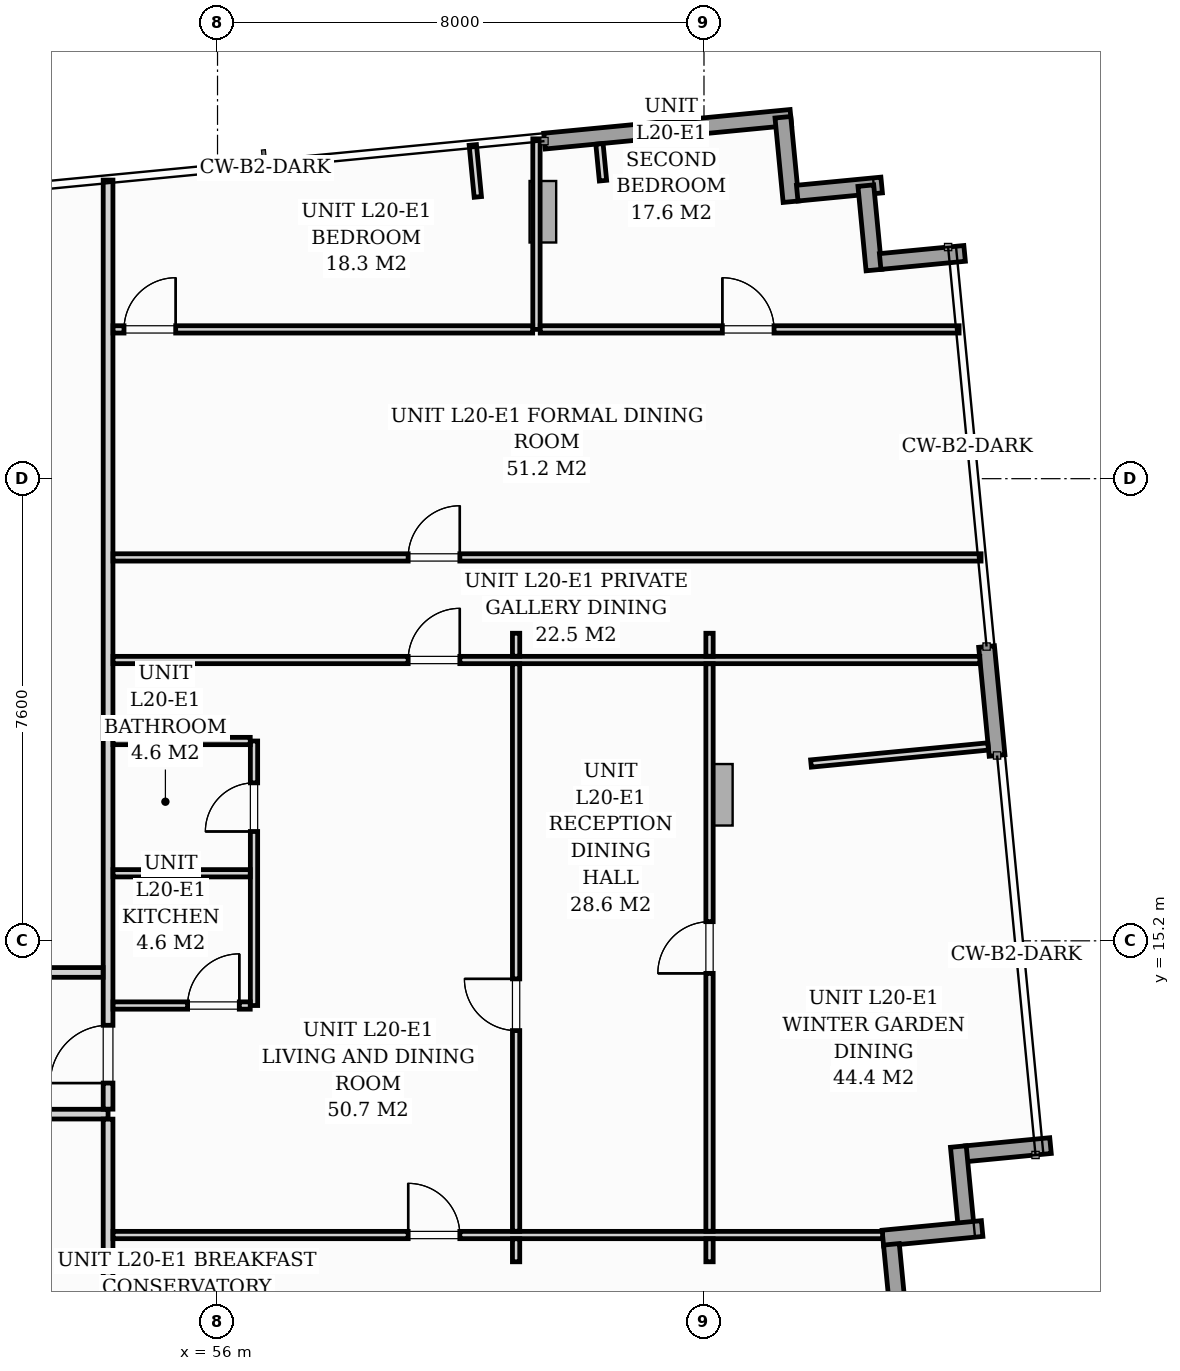
"""IFC4 building model, lengths in metres.
Left out: names, types, materials, properties, quantities, classifications, styles, units other than length and angle.
Written with IfcOpenShell. Run it as: python <this file> out.ifc"""

import sys

from ifc_helpers import new_model, si_unit, direction, frame, frame_2d, origin, origin_2d, place, context, subcontext, project, spatial, rectangle, i_section, extrude, source, transform, mapped, element, fill, save


model = new_model("IFC4")
c1 = context("Model", 3, precision=1e-05, world=origin(), true_north=direction((0.0, 1.0)))
c2 = subcontext(c1, "Body", "Model", "MODEL_VIEW")
j1 = project(units=[si_unit("LENGTHUNIT", "METRE"), si_unit("PLANEANGLEUNIT", "RADIAN")], contexts=[c1])
p1 = place(None, origin())
s1 = spatial("IfcSite", under=j1, at=p1, CompositionType="ELEMENT")
p2 = place(p1, origin())
s2 = spatial("IfcBuilding", under=s1, at=p2, CompositionType="ELEMENT")
p3 = place(p2, frame((0.0, 0.0, 72.6)))
s3 = spatial("IfcBuildingStorey", under=s2, at=p3, CompositionType="ELEMENT", Elevation=72.6)
m1 = source(origin(), c2, "Body", "SweptSolid", [
    extrude(i_section(OverallWidth=0.438, OverallDepth=1.011, WebThickness=0.041, FlangeThickness=0.074, FilletRadius=0.024, at=origin_2d()), origin(), (0.0, 0.0, 1.0), 6.973),
])
p4 = place(p3, frame((61.351, 7.073, 0.181), z_axis=(0.65764639219, 0.407667940303, 0.633488810705), x_axis=(-0.538430545128, -0.333767316198, 0.773751850861)))
e1 = element("IfcColumn", 1, at=p4, inside=s3, PredefinedType="COLUMN", context=c2, shape_type="MappedRepresentation", body=[
    mapped(m1, transform((0.0, 0.0, 0.0), scale=1.0)),
])
m2 = source(origin(), c2, "Body", "SweptSolid", [
    extrude(i_section(OverallWidth=0.438, OverallDepth=1.011, WebThickness=0.041, FlangeThickness=0.074, FilletRadius=0.024, at=origin_2d()), origin(), (0.0, 0.0, 1.0), 5.92),
])
p5 = place(p3, frame((60.451, 27.073, 0.155), z_axis=(0.650293455534, 0.084544747834, 0.754963977487), x_axis=(-0.74866329796, -0.097333825521, 0.655766263769)))
e2 = element("IfcColumn", 2, at=p5, inside=s3, PredefinedType="COLUMN", context=c2, shape_type="MappedRepresentation", body=[
    mapped(m2, transform((0.0, 0.0, 0.0), scale=1.0)),
])
m3 = source(origin(), c2, "Body", "SweptSolid", [
    extrude(i_section(OverallWidth=0.438, OverallDepth=1.011, WebThickness=0.041, FlangeThickness=0.074, FilletRadius=0.024, at=origin_2d()), origin(), (0.0, 0.0, 1.0), 6.378),
])
p6 = place(p3, frame((63.274, 17.188, 0.169), z_axis=(0.660728602065, 0.279718649785, 0.696559539002), x_axis=(-0.641445929974, -0.271555354016, 0.717498995557)))
e3 = element("IfcColumn", 3, at=p6, inside=s3, PredefinedType="COLUMN", context=c2, shape_type="MappedRepresentation", body=[
    mapped(m3, transform((0.0, 0.0, 0.0), scale=1.0)),
])
p7 = place(p3, frame((61.377, 28.351, 0.0), z_axis=(0.0, 0.0, 1.0), x_axis=(0.99539517086, 0.095856422986, 0.0)))
e4 = element("IfcWall", 4, at=p7, inside=s3, PredefinedType="STANDARD", context=c2, shape_type="SweptSolid", body=[
    extrude(rectangle(XDim=4.07, YDim=0.26, at=frame_2d((2.035, 0.0))), origin(), (0.0, 0.0, 1.0), 4.78),
])
for number, where, z_axis, x_axis in (
    (5, (65.298, 28.744, 0.0), (0.0, 0.0, 1.0), (0.096, -0.995, 0.0)),
    (6, (65.533, 27.496, 0.0), (0.0, 0.0, 1.0), (0.995, 0.096, 0.0)),
):
    element("IfcWall", number, at=place(p3, frame(where, z_axis=z_axis, x_axis=x_axis)), inside=s3, PredefinedType="STANDARD", context=c2, shape_type="SweptSolid", body=[
        extrude(rectangle(XDim=1.395, YDim=0.26, at=frame_2d((0.698, 0.0))), origin(), (0.0, 0.0, 1.0), 4.78),
    ])
p8 = place(p3, frame((66.662, 27.619, 0.0), z_axis=(0.0, 0.0, 1.0), x_axis=(0.095742423056, -0.99540614245, 0.0)))
e7 = element("IfcWall", 7, at=p8, inside=s3, PredefinedType="STANDARD", context=c2, shape_type="SweptSolid", body=[
    extrude(rectangle(XDim=1.395, YDim=0.26, at=frame_2d((0.697, 0.0))), origin(), (0.0, 0.0, 1.0), 4.78),
])
p9 = place(p3, frame((66.897, 26.371, 0.0), z_axis=(0.0, 0.0, 1.0), x_axis=(0.995391056452, 0.09589913835, 0.0)))
e8 = element("IfcWall", 8, at=p9, inside=s3, PredefinedType="STANDARD", context=c2, shape_type="SweptSolid", body=[
    extrude(rectangle(XDim=1.395, YDim=0.26, at=frame_2d((0.698, 0.0))), origin(), (0.0, 0.0, 1.0), 4.78),
])
p10 = place(p3, frame((68.647, 20.04, 0.0), z_axis=(0.0, 0.0, 1.0), x_axis=(0.095756341646, -0.995404803602, 0.0)))
e9 = element("IfcWall", 9, at=p10, inside=s3, PredefinedType="STANDARD", context=c2, shape_type="SweptSolid", body=[
    extrude(rectangle(XDim=1.8, YDim=0.26, at=frame_2d((0.9, 0.0))), origin(), (0.0, 0.0, 1.0), 4.78),
])
for number, where, z_axis, x_axis in (
    (10, (69.698, 11.833, 0.0), (0.0, 0.0, 1.0), (-0.995, -0.096, 0.0)),
    (11, (68.183, 11.817, 0.0), (0.0, 0.0, 1.0), (0.096, -0.995, 0.0)),
):
    element("IfcWall", number, at=place(p3, frame(where, z_axis=z_axis, x_axis=x_axis)), inside=s3, PredefinedType="STANDARD", context=c2, shape_type="SweptSolid", body=[
        extrude(rectangle(XDim=1.395, YDim=0.26, at=frame_2d((0.697, 0.0))), origin(), (0.0, 0.0, 1.0), 4.78),
    ])
p11 = place(p3, frame((68.574, 10.469, 0.0), z_axis=(0.0, 0.0, 1.0), x_axis=(-0.995394563142, -0.095862733462, 0.0)))
e12 = element("IfcWall", 12, at=p11, inside=s3, PredefinedType="STANDARD", context=c2, shape_type="SweptSolid", body=[
    extrude(rectangle(XDim=1.64, YDim=0.26, at=frame_2d((0.82, 0.0))), origin(), (0.0, 0.0, 1.0), 4.78),
])
p12 = place(p3, frame((67.082, 10.209, 0.0), z_axis=(0.0, 0.0, 1.0), x_axis=(0.09576095695, -0.995404359607, 0.0)))
e13 = element("IfcWall", 13, at=p12, inside=s3, PredefinedType="STANDARD", context=c2, shape_type="SweptSolid", body=[
    extrude(rectangle(XDim=1.15, YDim=0.26, at=frame_2d((0.575, 0.0))), origin(), (0.0, 0.0, 1.0), 4.78),
])
p13 = place(p3, frame((16.6, 12.35, 0.0), z_axis=(0.0, 0.0, 1.0), x_axis=(1.0, 0.0, 0.0)))
e14 = element("IfcWall", 14, at=p13, inside=s3, PredefinedType="PARTITIONING", context=c2, shape_type="SweptSolid", body=[
    extrude(rectangle(XDim=37.6, YDim=0.16, at=frame_2d((18.8, 0.0))), origin(), (0.0, 0.0, 1.0), 4.78),
])
p14 = place(p13, frame((2.665, 0.0, 0.0)))
e15 = element("IfcOpeningElement", 15, at=p14, cuts=e14, PredefinedType="OPENING", context=c2, shape_type="SweptSolid", body=[
    extrude(rectangle(XDim=0.95, YDim=2.06, at=frame_2d((0.475, 1.03))), frame((0.0, 0.09, 0.0), z_axis=(0.0, -1.0, 0.0), x_axis=(1.0, 0.0, 0.0)), (0.0, 0.0, 1.0), 0.18),
])
p15 = place(p13, frame((26.146, 0.0, 0.0)))
e16 = element("IfcOpeningElement", 16, at=p15, cuts=e14, PredefinedType="OPENING", context=c2, shape_type="SweptSolid", body=[
    extrude(rectangle(XDim=0.95, YDim=2.06, at=frame_2d((0.475, 1.03))), frame((0.0, 0.09, 0.0), z_axis=(0.0, -1.0, 0.0), x_axis=(1.0, 0.0, 0.0)), (0.0, 0.0, 1.0), 0.18),
])
p16 = place(p3, frame((54.2, 7.778, 0.0), z_axis=(0.0, 0.0, 1.0), x_axis=(0.0, 1.0, 0.0)))
e17 = element("IfcWall", 17, at=p16, inside=s3, PredefinedType="PARTITIONING", context=c2, shape_type="SweptSolid", body=[
    extrude(rectangle(XDim=4.49, YDim=0.16, at=frame_2d((2.245, 0.0))), origin(), (0.0, 0.0, 1.0), 4.78),
])
p17 = place(p3, frame((54.2, 12.432, 0.0), z_axis=(0.0, 0.0, 1.0), x_axis=(0.0, 1.0, 0.0)))
e18 = element("IfcWall", 18, at=p17, inside=s3, PredefinedType="PARTITIONING", context=c2, shape_type="SweptSolid", body=[
    extrude(rectangle(XDim=15.278, YDim=0.16, at=frame_2d((7.639, 0.0))), origin(), (0.0, 0.0, 1.0), 4.78),
])
p18 = place(p17, frame((0.429, 0.0, 0.0)))
e19 = element("IfcOpeningElement", 19, at=p18, cuts=e18, PredefinedType="OPENING", context=c2, shape_type="SweptSolid", body=[
    extrude(rectangle(XDim=0.95, YDim=2.06, at=frame_2d((0.475, 1.03))), frame((0.0, 0.09, 0.0), z_axis=(0.0, -1.0, 0.0), x_axis=(1.0, 0.0, 0.0)), (0.0, 0.0, 1.0), 0.18),
])
p19 = place(p3, frame((56.6, 14.136, 0.0), z_axis=(0.0, 0.0, 1.0), x_axis=(0.0, 1.0, 0.0)))
e20 = element("IfcWall", 20, at=p19, inside=s3, PredefinedType="PARTITIONING", context=c2, shape_type="SweptSolid", body=[
    extrude(rectangle(XDim=4.35, YDim=0.12, at=frame_2d((2.175, 0.0))), origin(), (0.0, 0.0, 1.0), 4.78),
])
p20 = place(p19, frame((2.862, 0.0, 0.0)))
e21 = element("IfcOpeningElement", 21, at=p20, cuts=e20, PredefinedType="OPENING", context=c2, shape_type="SweptSolid", body=[
    extrude(rectangle(XDim=0.8, YDim=2.02, at=frame_2d((0.4, 1.01))), frame((0.0, 0.07, 0.0), z_axis=(0.0, -1.0, 0.0), x_axis=(1.0, 0.0, 0.0)), (0.0, 0.0, 1.0), 0.14),
])
p21 = place(p3, frame((54.282, 16.311, 0.0), z_axis=(0.0, 0.0, 1.0), x_axis=(1.0, 0.0, 0.0)))
e22 = element("IfcWall", 22, at=p21, inside=s3, PredefinedType="PARTITIONING", context=c2, shape_type="SweptSolid", body=[
    extrude(rectangle(XDim=2.256, YDim=0.12, at=frame_2d((1.128, 0.0))), origin(), (0.0, 0.0, 1.0), 4.78),
])
p22 = place(p3, frame((54.282, 14.136, 0.0), z_axis=(0.0, 0.0, 1.0), x_axis=(1.0, 0.0, 0.0)))
e23 = element("IfcWall", 23, at=p22, inside=s3, PredefinedType="PARTITIONING", context=c2, shape_type="SweptSolid", body=[
    extrude(rectangle(XDim=2.256, YDim=0.12, at=frame_2d((1.128, 0.0))), origin(), (0.0, 0.0, 1.0), 4.78),
])
p23 = place(p22, frame((1.226, 0.0, 0.0)))
e24 = element("IfcOpeningElement", 24, at=p23, cuts=e23, PredefinedType="OPENING", context=c2, shape_type="SweptSolid", body=[
    extrude(rectangle(XDim=0.85, YDim=2.05, at=frame_2d((0.425, 1.025))), frame((0.0, 0.07, 0.0), z_axis=(0.0, -1.0, 0.0), x_axis=(1.0, 0.0, 0.0)), (0.0, 0.0, 1.0), 0.14),
])
p24 = place(p3, frame((54.282, 18.486, 0.0), z_axis=(0.0, 0.0, 1.0), x_axis=(1.0, 0.0, 0.0)))
e25 = element("IfcWall", 25, at=p24, inside=s3, PredefinedType="PARTITIONING", context=c2, shape_type="SweptSolid", body=[
    extrude(rectangle(XDim=2.256, YDim=0.12, at=frame_2d((1.128, 0.0))), origin(), (0.0, 0.0, 1.0), 4.78),
])
p25 = place(p3, frame((61.245, 25.255, 0.0), z_axis=(0.0, 0.0, 1.0), x_axis=(0.0, 1.0, 0.0)))
e26 = element("IfcWall", 26, at=p25, inside=s3, PredefinedType="PARTITIONING", context=c2, shape_type="SweptSolid", body=[
    extrude(rectangle(XDim=3.134, YDim=0.12, at=frame_2d((1.567, 0.0))), origin(), (0.0, 0.0, 1.0), 4.78),
])
p26 = place(p3, frame((54.282, 25.255, 0.0), z_axis=(0.0, 0.0, 1.0), x_axis=(1.0, 0.0, 0.0)))
e27 = element("IfcWall", 27, at=p26, inside=s3, PredefinedType="PARTITIONING", context=c2, shape_type="SweptSolid", body=[
    extrude(rectangle(XDim=6.901, YDim=0.12, at=frame_2d((3.451, 0.0))), origin(), (0.0, 0.0, 1.0), 4.78),
])
p27 = place(p26, frame((0.18, 0.0, 0.0)))
e28 = element("IfcOpeningElement", 28, at=p27, cuts=e27, PredefinedType="OPENING", context=c2, shape_type="SweptSolid", body=[
    extrude(rectangle(XDim=0.85, YDim=2.05, at=frame_2d((0.425, 1.025))), frame((0.0, 0.07, 0.0), z_axis=(0.0, -1.0, 0.0), x_axis=(1.0, 0.0, 0.0)), (0.0, 0.0, 1.0), 0.14),
])
p28 = place(p3, frame((61.307, 25.255, 0.0), z_axis=(0.0, 0.0, 1.0), x_axis=(1.0, 0.0, 0.0)))
e29 = element("IfcWall", 29, at=p28, inside=s3, PredefinedType="PARTITIONING", context=c2, shape_type="SweptSolid", body=[
    extrude(rectangle(XDim=6.888, YDim=0.12, at=frame_2d((3.444, 0.0))), origin(), (0.0, 0.0, 1.0), 4.78),
])
p29 = place(p28, frame((2.995, 0.0, 0.0)))
e30 = element("IfcOpeningElement", 30, at=p29, cuts=e29, PredefinedType="OPENING", context=c2, shape_type="SweptSolid", body=[
    extrude(rectangle(XDim=0.85, YDim=2.05, at=frame_2d((0.425, 1.025))), frame((0.0, 0.07, 0.0), z_axis=(0.0, -1.0, 0.0), x_axis=(1.0, 0.0, 0.0)), (0.0, 0.0, 1.0), 0.14),
])
p30 = place(p3, frame((54.282, 21.505, 0.0), z_axis=(0.0, 0.0, 1.0), x_axis=(1.0, 0.0, 0.0)))
e31 = element("IfcWall", 31, at=p30, inside=s3, PredefinedType="PARTITIONING", context=c2, shape_type="SweptSolid", body=[
    extrude(rectangle(XDim=14.274, YDim=0.12, at=frame_2d((7.137, 0.0))), origin(), (0.0, 0.0, 1.0), 4.78),
])
p31 = place(p30, frame((4.853, 0.0, 0.0)))
e32 = element("IfcOpeningElement", 32, at=p31, cuts=e31, PredefinedType="OPENING", context=c2, shape_type="SweptSolid", body=[
    extrude(rectangle(XDim=0.85, YDim=2.05, at=frame_2d((0.425, 1.025))), frame((0.0, 0.07, 0.0), z_axis=(0.0, -1.0, 0.0), x_axis=(1.0, 0.0, 0.0)), (0.0, 0.0, 1.0), 0.14),
])
p32 = place(p3, frame((54.282, 10.362, 0.0), z_axis=(0.0, 0.0, 1.0), x_axis=(1.0, 0.0, 0.0)))
e33 = element("IfcWall", 33, at=p32, inside=s3, PredefinedType="PARTITIONING", context=c2, shape_type="SweptSolid", body=[
    extrude(rectangle(XDim=12.655, YDim=0.12, at=frame_2d((6.327, 0.0))), origin(), (0.0, 0.0, 1.0), 4.78),
])
p33 = place(p32, frame((4.853, 0.0, 0.0)))
e34 = element("IfcOpeningElement", 34, at=p33, cuts=e33, PredefinedType="OPENING", context=c2, shape_type="SweptSolid", body=[
    extrude(rectangle(XDim=0.85, YDim=2.05, at=frame_2d((0.425, 1.025))), frame((0.0, 0.07, 0.0), z_axis=(0.0, -1.0, 0.0), x_axis=(1.0, 0.0, 0.0)), (0.0, 0.0, 1.0), 0.14),
])
p34 = place(p3, frame((54.282, 19.818, 0.0), z_axis=(0.0, 0.0, 1.0), x_axis=(1.0, 0.0, 0.0)))
e35 = element("IfcWall", 35, at=p34, inside=s3, PredefinedType="PARTITIONING", context=c2, shape_type="SweptSolid", body=[
    extrude(rectangle(XDim=14.254, YDim=0.12, at=frame_2d((7.127, 0.0))), origin(), (0.0, 0.0, 1.0), 4.78),
])
p35 = place(p34, frame((4.853, 0.0, 0.0)))
e36 = element("IfcOpeningElement", 36, at=p35, cuts=e35, PredefinedType="OPENING", context=c2, shape_type="SweptSolid", body=[
    extrude(rectangle(XDim=0.85, YDim=2.05, at=frame_2d((0.425, 1.025))), frame((0.0, 0.07, 0.0), z_axis=(0.0, -1.0, 0.0), x_axis=(1.0, 0.0, 0.0)), (0.0, 0.0, 1.0), 0.14),
])
p36 = place(p3, frame((64.091, 9.922, 0.0), z_axis=(0.0, 0.0, 1.0), x_axis=(0.0, 1.0, 0.0)))
e37 = element("IfcWall", 37, at=p36, inside=s3, PredefinedType="PARTITIONING", context=c2, shape_type="SweptSolid", body=[
    extrude(rectangle(XDim=0.378, YDim=0.12, at=frame_2d((0.189, 0.0))), origin(), (0.0, 0.0, 1.0), 4.78),
])
p37 = place(p3, frame((64.091, 10.424, 0.0), z_axis=(0.0, 0.0, 1.0), x_axis=(0.0, 1.0, 0.0)))
e38 = element("IfcWall", 38, at=p37, inside=s3, PredefinedType="PARTITIONING", context=c2, shape_type="SweptSolid", body=[
    extrude(rectangle(XDim=9.332, YDim=0.12, at=frame_2d((4.666, 0.0))), origin(), (0.0, 0.0, 1.0), 4.78),
])
p38 = place(p37, frame((4.241, 0.0, 0.0)))
e39 = element("IfcOpeningElement", 39, at=p38, cuts=e38, PredefinedType="OPENING", context=c2, shape_type="SweptSolid", body=[
    extrude(rectangle(XDim=0.85, YDim=2.05, at=frame_2d((0.425, 1.025))), frame((0.0, 0.07, 0.0), z_axis=(0.0, -1.0, 0.0), x_axis=(1.0, 0.0, 0.0)), (0.0, 0.0, 1.0), 0.14),
])
p39 = place(p3, frame((64.091, 19.88, 0.0), z_axis=(0.0, 0.0, 1.0), x_axis=(0.0, 1.0, 0.0)))
e40 = element("IfcWall", 40, at=p39, inside=s3, PredefinedType="PARTITIONING", context=c2, shape_type="SweptSolid", body=[
    extrude(rectangle(XDim=0.378, YDim=0.12, at=frame_2d((0.189, 0.0))), origin(), (0.0, 0.0, 1.0), 4.78),
])
p40 = place(p3, frame((60.91, 9.922, 0.0), z_axis=(0.0, 0.0, 1.0), x_axis=(0.0, 1.0, 0.0)))
e41 = element("IfcWall", 41, at=p40, inside=s3, PredefinedType="PARTITIONING", context=c2, shape_type="SweptSolid", body=[
    extrude(rectangle(XDim=0.378, YDim=0.12, at=frame_2d((0.189, 0.0))), origin(), (0.0, 0.0, 1.0), 4.78),
])
p41 = place(p3, frame((60.91, 10.424, 0.0), z_axis=(0.0, 0.0, 1.0), x_axis=(0.0, 1.0, 0.0)))
e42 = element("IfcWall", 42, at=p41, inside=s3, PredefinedType="PARTITIONING", context=c2, shape_type="SweptSolid", body=[
    extrude(rectangle(XDim=9.332, YDim=0.12, at=frame_2d((4.666, 0.0))), origin(), (0.0, 0.0, 1.0), 4.78),
])
p42 = place(p41, frame((3.3, 0.0, 0.0)))
e43 = element("IfcOpeningElement", 43, at=p42, cuts=e42, PredefinedType="OPENING", context=c2, shape_type="SweptSolid", body=[
    extrude(rectangle(XDim=0.85, YDim=2.05, at=frame_2d((0.425, 1.025))), frame((0.0, 0.07, 0.0), z_axis=(0.0, -1.0, 0.0), x_axis=(1.0, 0.0, 0.0)), (0.0, 0.0, 1.0), 0.14),
])
p43 = place(p3, frame((60.91, 19.88, 0.0), z_axis=(0.0, 0.0, 1.0), x_axis=(0.0, 1.0, 0.0)))
e44 = element("IfcWall", 44, at=p43, inside=s3, PredefinedType="PARTITIONING", context=c2, shape_type="SweptSolid", body=[
    extrude(rectangle(XDim=0.378, YDim=0.12, at=frame_2d((0.189, 0.0))), origin(), (0.0, 0.0, 1.0), 4.78),
])
p44 = place(p3, frame((45.84, 14.68, 0.0), z_axis=(0.0, 0.0, 1.0), x_axis=(1.0, 0.0, 0.0)))
e45 = element("IfcWall", 45, at=p44, inside=s3, PredefinedType="PARTITIONING", context=c2, shape_type="SweptSolid", body=[
    extrude(rectangle(XDim=8.278, YDim=0.16, at=frame_2d((4.139, 0.0))), origin(), (0.0, 0.0, 1.0), 4.78),
])
p45 = place(p44, frame((3.765, 0.0, 0.0)))
e46 = element("IfcOpeningElement", 46, at=p45, cuts=e45, PredefinedType="OPENING", context=c2, shape_type="SweptSolid", body=[
    extrude(rectangle(XDim=0.95, YDim=2.06, at=frame_2d((0.475, 1.03))), frame((0.0, 0.09, 0.0), z_axis=(0.0, -1.0, 0.0), x_axis=(1.0, 0.0, 0.0)), (0.0, 0.0, 1.0), 0.18),
])
p46 = place(p3, frame((62.339, 27.701, 0.0), z_axis=(0.0, 0.0, 1.0), x_axis=(-0.095720070118, 0.995408292198, 0.0)))
e47 = element("IfcWall", 47, at=p46, inside=s3, PredefinedType="PARTITIONING", context=c2, shape_type="SweptSolid", body=[
    extrude(rectangle(XDim=0.607, YDim=0.12, at=frame_2d((0.303, 0.0))), origin(), (0.0, 0.0, 1.0), 4.78),
])
p47 = place(p3, frame((65.76, 18.116, 0.0), z_axis=(0.0, 0.0, 1.0), x_axis=(0.995396335344, 0.095844329951, 0.0)))
e48 = element("IfcWall", 48, at=p47, inside=s3, PredefinedType="PARTITIONING", context=c2, shape_type="SweptSolid", body=[
    extrude(rectangle(XDim=2.927, YDim=0.12, at=frame_2d((1.463, 0.0))), origin(), (0.0, 0.0, 1.0), 4.78),
])
p48 = place(p3, frame((60.281, 27.434, 0.0), z_axis=(0.0, 0.0, 1.0), x_axis=(-0.09586960411, 0.995393901432, 0.0)))
e49 = element("IfcWall", 49, at=p48, inside=s3, PredefinedType="PARTITIONING", context=c2, shape_type="SweptSolid", body=[
    extrude(rectangle(XDim=0.858, YDim=0.12, at=frame_2d((0.429, 0.0))), origin(), (0.0, 0.0, 1.0), 4.78),
])
m4 = source(origin(), c2, "Body", "SweptSolid", [
    extrude(rectangle(XDim=0.95, YDim=2.06, at=frame_2d((0.475, 1.03))), frame((0.0, 0.025, 0.0), z_axis=(0.0, -1.0, 0.0), x_axis=(1.0, 0.0, 0.0)), (0.0, 0.0, 1.0), 0.05),
])
p49 = place(p18, origin())
e50 = element("IfcDoor", 50, at=p49, inside=s3, OperationType="SINGLE_SWING_LEFT", PredefinedType="DOOR", context=c2, shape_type="MappedRepresentation", body=[
    mapped(m4, transform((0.0, 0.0, 0.0), scale=1.0)),
])
fill(e19, e50)
m5 = source(origin(), c2, "Body", "SweptSolid", [
    extrude(rectangle(XDim=0.85, YDim=2.05, at=frame_2d((0.425, 1.025))), frame((0.0, 0.025, 0.0), z_axis=(0.0, -1.0, 0.0), x_axis=(1.0, 0.0, 0.0)), (0.0, 0.0, 1.0), 0.05),
])
p50 = place(p23, origin())
e51 = element("IfcDoor", 51, at=p50, inside=s3, OperationType="SINGLE_SWING_RIGHT", PredefinedType="DOOR", context=c2, shape_type="MappedRepresentation", body=[
    mapped(m5, transform((0.0, 0.0, 0.0), scale=1.0)),
])
fill(e24, e51)
m6 = source(origin(), c2, "Body", "SweptSolid", [
    extrude(rectangle(XDim=0.8, YDim=2.02, at=frame_2d((0.4, 1.01))), frame((0.0, 0.025, 0.0), z_axis=(0.0, -1.0, 0.0), x_axis=(1.0, 0.0, 0.0)), (0.0, 0.0, 1.0), 0.05),
])
p51 = place(p20, origin())
e52 = element("IfcDoor", 52, at=p51, inside=s3, OperationType="SINGLE_SWING_LEFT", PredefinedType="DOOR", context=c2, shape_type="MappedRepresentation", body=[
    mapped(m6, transform((0.0, 0.0, 0.0), scale=1.0)),
])
fill(e21, e52)
p52 = place(p27, origin())
e53 = element("IfcDoor", 53, at=p52, inside=s3, OperationType="SINGLE_SWING_RIGHT", PredefinedType="DOOR", context=c2, shape_type="MappedRepresentation", body=[
    mapped(m5, transform((0.0, 0.0, 0.0), scale=1.0)),
])
fill(e28, e53)
p53 = place(p29, origin())
e54 = element("IfcDoor", 54, at=p53, inside=s3, OperationType="SINGLE_SWING_LEFT", PredefinedType="DOOR", context=c2, shape_type="MappedRepresentation", body=[
    mapped(m5, transform((0.0, 0.0, 0.0), scale=1.0)),
])
fill(e30, e54)
p54 = place(p31, origin())
e55 = element("IfcDoor", 55, at=p54, inside=s3, OperationType="SINGLE_SWING_RIGHT", PredefinedType="DOOR", context=c2, shape_type="MappedRepresentation", body=[
    mapped(m5, transform((0.0, 0.0, 0.0), scale=1.0)),
])
fill(e32, e55)
p55 = place(p33, origin())
e56 = element("IfcDoor", 56, at=p55, inside=s3, OperationType="SINGLE_SWING_LEFT", PredefinedType="DOOR", context=c2, shape_type="MappedRepresentation", body=[
    mapped(m5, transform((0.0, 0.0, 0.0), scale=1.0)),
])
fill(e34, e56)
p56 = place(p35, origin())
e57 = element("IfcDoor", 57, at=p56, inside=s3, OperationType="SINGLE_SWING_RIGHT", PredefinedType="DOOR", context=c2, shape_type="MappedRepresentation", body=[
    mapped(m5, transform((0.0, 0.0, 0.0), scale=1.0)),
])
fill(e36, e57)
p57 = place(p38, origin())
e58 = element("IfcDoor", 58, at=p57, inside=s3, OperationType="SINGLE_SWING_LEFT", PredefinedType="DOOR", context=c2, shape_type="MappedRepresentation", body=[
    mapped(m5, transform((0.0, 0.0, 0.0), scale=1.0)),
])
fill(e39, e58)
p58 = place(p42, origin())
e59 = element("IfcDoor", 59, at=p58, inside=s3, OperationType="SINGLE_SWING_RIGHT", PredefinedType="DOOR", context=c2, shape_type="MappedRepresentation", body=[
    mapped(m5, transform((0.0, 0.0, 0.0), scale=1.0)),
])
fill(e43, e59)
save(model, sys.argv[1])
